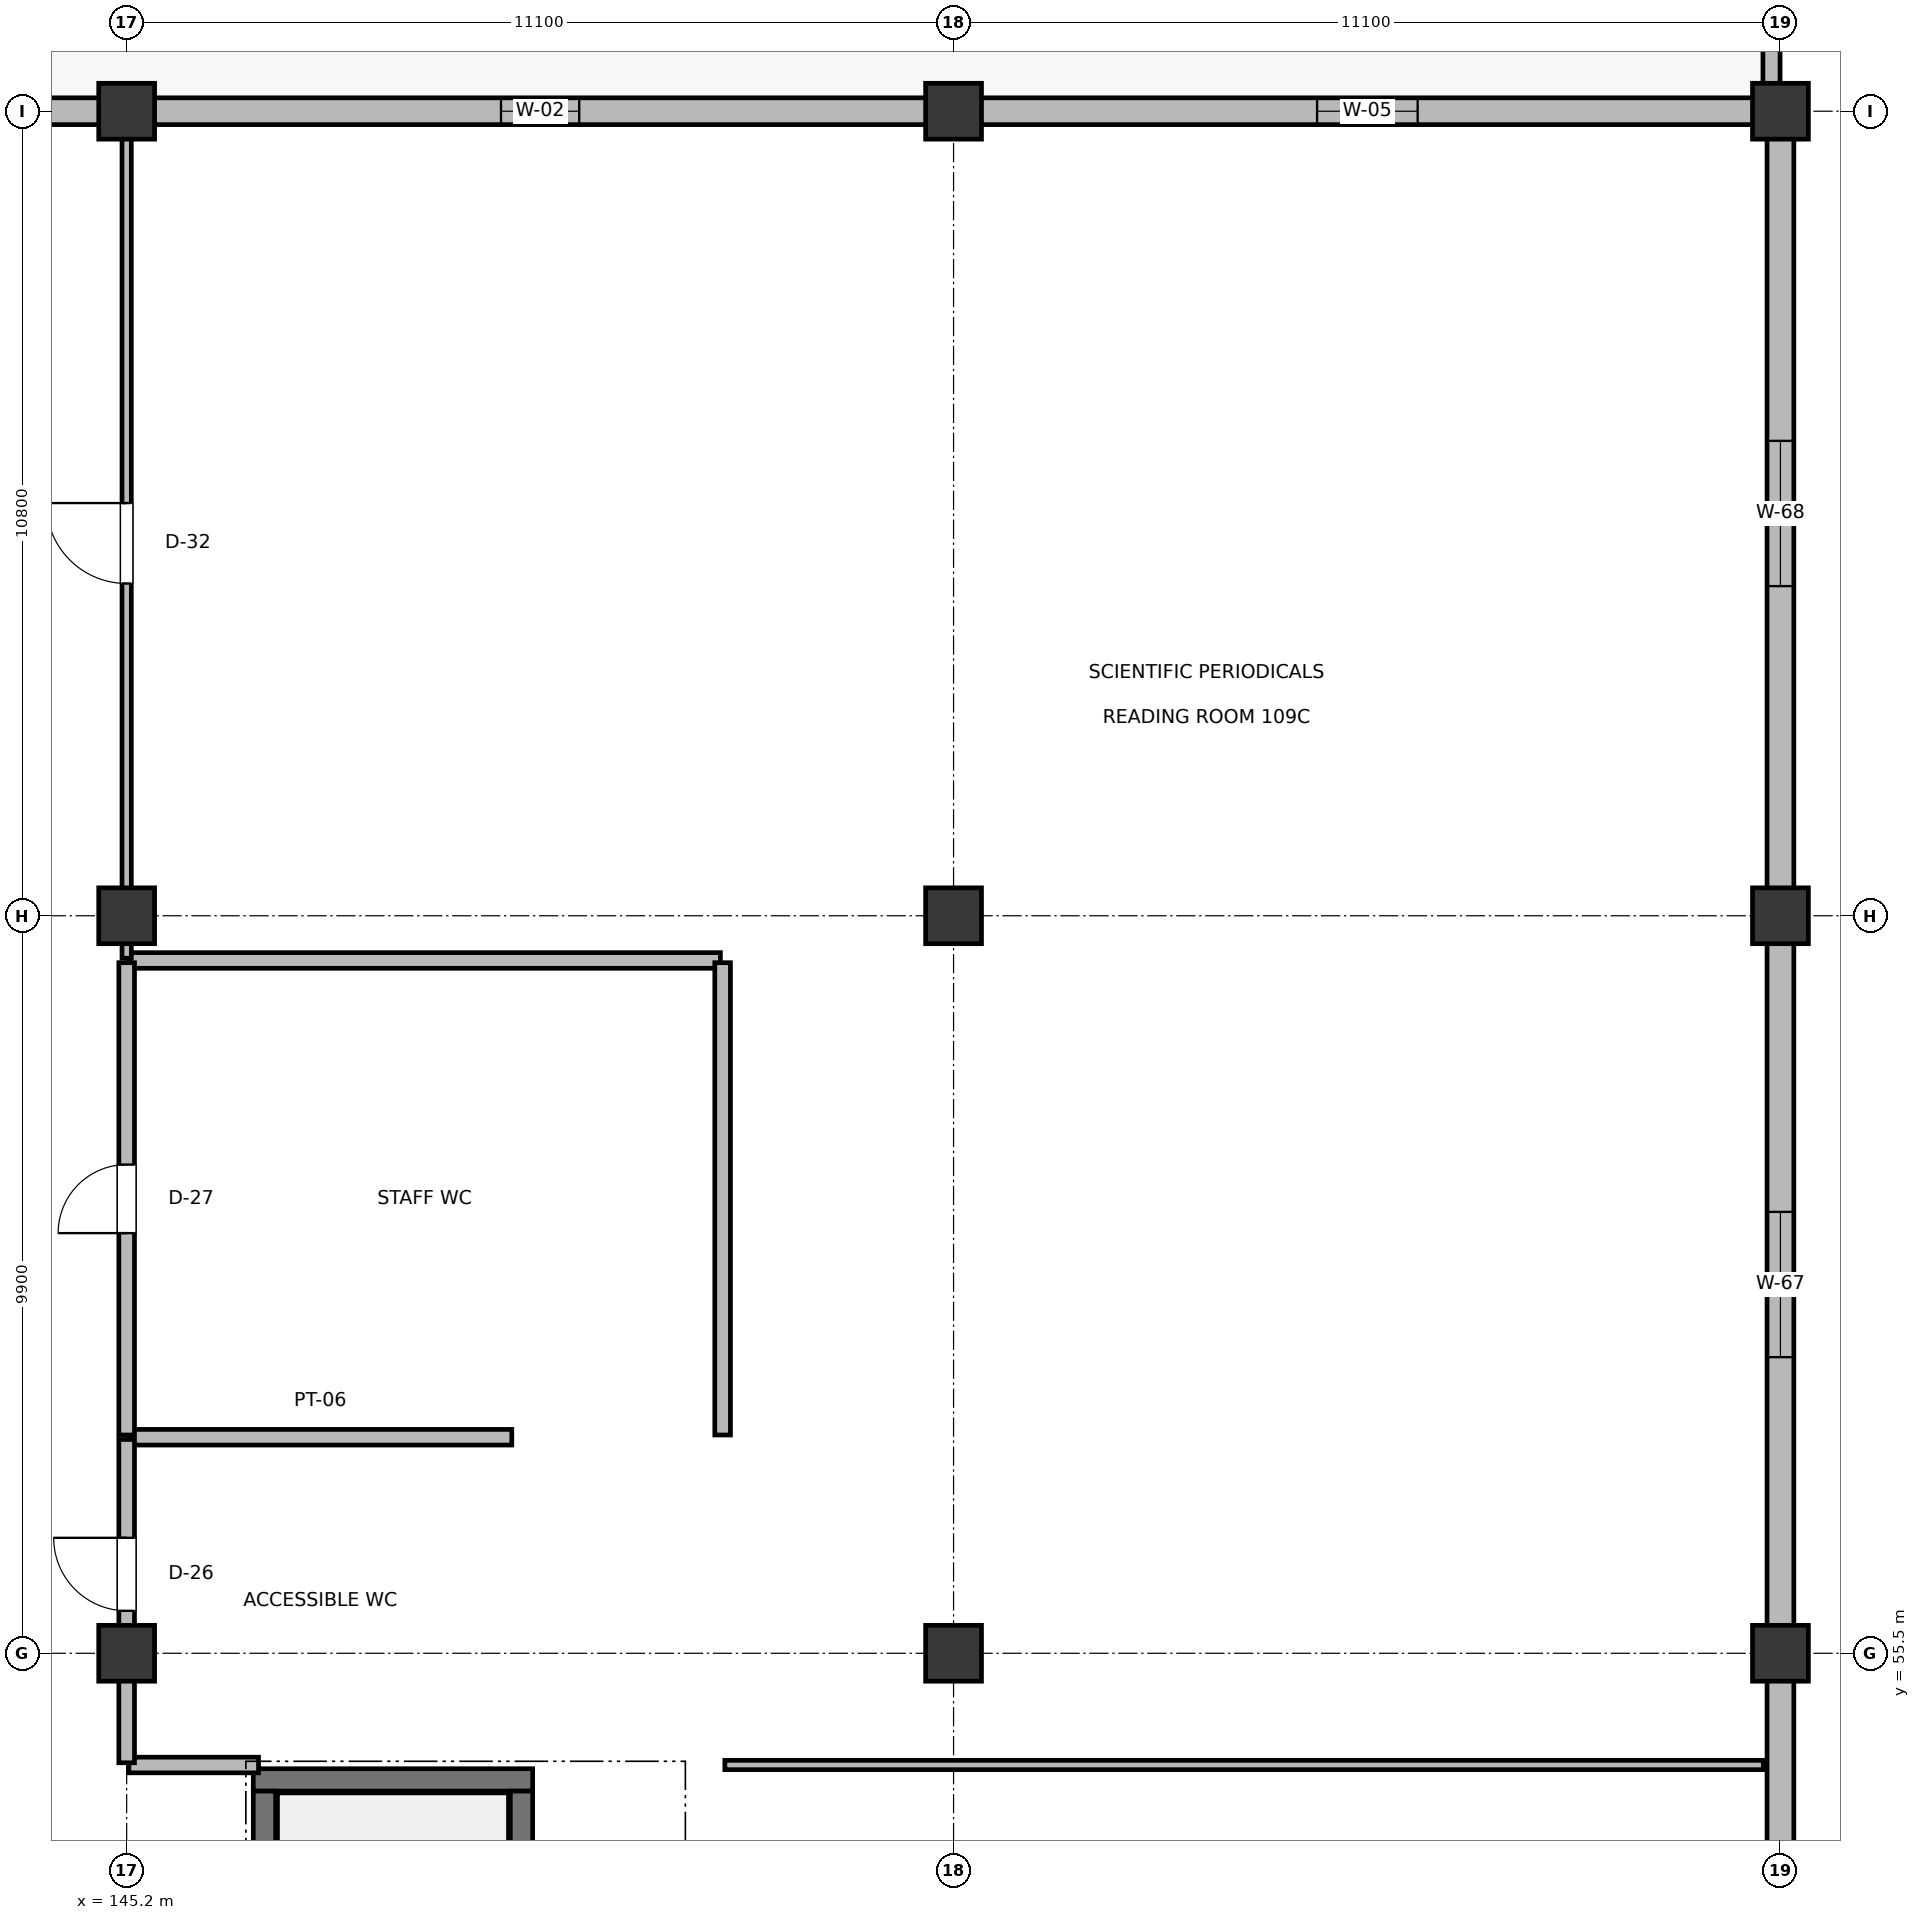
"""IFC4 building model, lengths in metres.
Left out: names, types, materials, properties, quantities, classifications, styles, units other than length and angle.
Written with IfcOpenShell. Run it as: python <this file> out.ifc"""

import sys

from ifc_helpers import new_model, si_unit, direction, frame, frame_2d, origin, origin_2d, place, context, subcontext, project, spatial, rectangle, extrude, element, fill, save


model = new_model("IFC4")
c1 = context("Model", 3, precision=1e-05, world=origin(), true_north=direction((0.0, 1.0)))
c2 = subcontext(c1, "Body", "Model", "MODEL_VIEW")
j1 = project(units=[si_unit("LENGTHUNIT", "METRE"), si_unit("PLANEANGLEUNIT", "RADIAN")], contexts=[c1])
p1 = place(None, origin())
s1 = spatial("IfcSite", under=j1, at=p1, CompositionType="ELEMENT")
p2 = place(p1, origin())
s2 = spatial("IfcBuilding", under=s1, at=p2, CompositionType="ELEMENT")
p3 = place(p2, frame((0.0, 0.0, 5.4)))
s3 = spatial("IfcBuildingStorey", under=s2, at=p3, CompositionType="ELEMENT", Elevation=5.4)
for number, where, z_axis, x_axis in (
    (1, (145.2, 55.5, 0.0), (0.0, 0.0, 1.0), (1.0, 0.0, 0.0)),
    (2, (145.2, 65.4, 0.0), (0.0, 0.0, 1.0), (1.0, 0.0, 0.0)),
    (3, (145.2, 76.2, 0.0), (0.0, 0.0, 1.0), (1.0, 0.0, 0.0)),
    (4, (156.3, 55.5, 0.0), (0.0, 0.0, 1.0), (1.0, 0.0, 0.0)),
    (5, (156.3, 65.4, 0.0), (0.0, 0.0, 1.0), (1.0, 0.0, 0.0)),
    (6, (156.3, 76.2, 0.0), (0.0, 0.0, 1.0), (1.0, 0.0, 0.0)),
    (7, (167.4, 55.5, 0.0), (0.0, 0.0, 1.0), (1.0, 0.0, 0.0)),
    (8, (167.4, 65.4, 0.0), (0.0, 0.0, 1.0), (1.0, 0.0, 0.0)),
    (9, (167.4, 76.2, 0.0), (0.0, 0.0, 1.0), (1.0, 0.0, 0.0)),
):
    element("IfcColumn", number, at=place(p3, frame(where, z_axis=z_axis, x_axis=x_axis)), inside=s3, PredefinedType="COLUMN", context=c2, shape_type="SweptSolid", body=[
        extrude(rectangle(XDim=0.75, YDim=0.75, at=origin_2d()), origin(), (0.0, 0.0, 1.0), 4.8),
    ])
p4 = place(p3, frame((167.4, 45.965, 0.0), z_axis=(0.0, 0.0, 1.0), x_axis=(0.0, 1.0, 0.0)))
e10 = element("IfcWall", 10, at=p4, inside=s3, PredefinedType="SOLIDWALL", context=c2, shape_type="SweptSolid", body=[
    extrude(rectangle(XDim=9.17, YDim=0.36, at=frame_2d((4.585, 0.0))), origin(), (0.0, 0.0, 1.0), 3.775),
])
p5 = place(p4, frame((3.61, 0.0, 0.85)))
e11 = element("IfcOpeningElement", 11, at=p5, cuts=e10, PredefinedType="OPENING", context=c2, shape_type="SweptSolid", body=[
    extrude(rectangle(XDim=1.95, YDim=1.35, at=frame_2d((0.975, 0.675))), frame((0.0, 0.19, 0.0), z_axis=(0.0, -1.0, 0.0), x_axis=(1.0, 0.0, 0.0)), (0.0, 0.0, 1.0), 0.38),
])
p6 = place(p3, frame((167.4, 55.865, 0.0), z_axis=(0.0, 0.0, 1.0), x_axis=(0.0, 1.0, 0.0)))
e12 = element("IfcWall", 12, at=p6, inside=s3, PredefinedType="SOLIDWALL", context=c2, shape_type="SweptSolid", body=[
    extrude(rectangle(XDim=9.17, YDim=0.36, at=frame_2d((4.585, 0.0))), origin(), (0.0, 0.0, 1.0), 3.775),
])
p7 = place(p6, frame((3.61, 0.0, 0.85)))
e13 = element("IfcOpeningElement", 13, at=p7, cuts=e12, PredefinedType="OPENING", context=c2, shape_type="SweptSolid", body=[
    extrude(rectangle(XDim=1.95, YDim=1.55, at=frame_2d((0.975, 0.775))), frame((0.0, 0.19, 0.0), z_axis=(0.0, -1.0, 0.0), x_axis=(1.0, 0.0, 0.0)), (0.0, 0.0, 1.0), 0.38),
])
p8 = place(p3, frame((167.4, 65.765, 0.0), z_axis=(0.0, 0.0, 1.0), x_axis=(0.0, 1.0, 0.0)))
e14 = element("IfcWall", 14, at=p8, inside=s3, PredefinedType="SOLIDWALL", context=c2, shape_type="SweptSolid", body=[
    extrude(rectangle(XDim=10.07, YDim=0.36, at=frame_2d((5.035, 0.0))), origin(), (0.0, 0.0, 1.0), 3.775),
])
p9 = place(p8, frame((4.06, 0.0, 0.85)))
e15 = element("IfcOpeningElement", 15, at=p9, cuts=e14, PredefinedType="OPENING", context=c2, shape_type="SweptSolid", body=[
    extrude(rectangle(XDim=1.95, YDim=1.75, at=frame_2d((0.975, 0.875))), frame((0.0, 0.19, 0.0), z_axis=(0.0, -1.0, 0.0), x_axis=(1.0, 0.0, 0.0)), (0.0, 0.0, 1.0), 0.38),
])
p10 = place(p3, frame((134.165, 76.2, 0.0), z_axis=(0.0, 0.0, 1.0), x_axis=(1.0, 0.0, 0.0)))
e16 = element("IfcWall", 16, at=p10, inside=s3, PredefinedType="SOLIDWALL", context=c2, shape_type="SweptSolid", body=[
    extrude(rectangle(XDim=10.67, YDim=0.36, at=frame_2d((5.335, 0.0))), origin(), (0.0, 0.0, 1.0), 3.555),
])
p11 = place(p10, frame((4.26, 0.0, 0.85)))
e17 = element("IfcOpeningElement", 17, at=p11, cuts=e16, PredefinedType="OPENING", context=c2, shape_type="SweptSolid", body=[
    extrude(rectangle(XDim=2.15, YDim=1.35, at=frame_2d((1.075, 0.675))), frame((0.0, 0.19, 0.0), z_axis=(0.0, -1.0, 0.0), x_axis=(1.0, 0.0, 0.0)), (0.0, 0.0, 1.0), 0.38),
])
p12 = place(p3, frame((145.555, 76.2, 0.0), z_axis=(0.0, 0.0, 1.0), x_axis=(1.0, 0.0, 0.0)))
e18 = element("IfcWall", 18, at=p12, inside=s3, PredefinedType="SOLIDWALL", context=c2, shape_type="SweptSolid", body=[
    extrude(rectangle(XDim=10.39, YDim=0.36, at=frame_2d((5.195, 0.0))), origin(), (0.0, 0.0, 1.0), 3.675),
])
p13 = place(p12, frame((4.67, 0.0, 0.85)))
e19 = element("IfcOpeningElement", 19, at=p13, cuts=e18, PredefinedType="OPENING", context=c2, shape_type="SweptSolid", body=[
    extrude(rectangle(XDim=1.05, YDim=1.8, at=frame_2d((0.525, 0.9))), frame((0.0, 0.19, 0.0), z_axis=(0.0, -1.0, 0.0), x_axis=(1.0, 0.0, 0.0)), (0.0, 0.0, 1.0), 0.38),
])
p14 = place(p3, frame((156.665, 76.2, 0.0), z_axis=(0.0, 0.0, 1.0), x_axis=(1.0, 0.0, 0.0)))
e20 = element("IfcWall", 20, at=p14, inside=s3, PredefinedType="SOLIDWALL", context=c2, shape_type="SweptSolid", body=[
    extrude(rectangle(XDim=10.38, YDim=0.36, at=frame_2d((5.19, 0.0))), origin(), (0.0, 0.0, 1.0), 3.955),
])
p15 = place(p14, frame((4.515, 0.0, 0.85)))
e21 = element("IfcOpeningElement", 21, at=p15, cuts=e20, PredefinedType="OPENING", context=c2, shape_type="SweptSolid", body=[
    extrude(rectangle(XDim=1.35, YDim=1.85, at=frame_2d((0.675, 0.925))), frame((0.0, 0.19, 0.0), z_axis=(0.0, -1.0, 0.0), x_axis=(1.0, 0.0, 0.0)), (0.0, 0.0, 1.0), 0.38),
])
p16 = place(p3, frame((167.28, 76.55, 0.0), z_axis=(0.0, 0.0, 1.0), x_axis=(0.0, 1.0, 0.0)))
e22 = element("IfcWall", 22, at=p16, inside=s3, PredefinedType="PARAPET", context=c2, shape_type="SweptSolid", body=[
    extrude(rectangle(XDim=40.1, YDim=0.23, at=frame_2d((20.05, 0.0))), origin(), (0.0, 0.0, 1.0), 1.05),
])
p17 = place(p3, frame((146.9, 53.8, 0.0), z_axis=(0.0, 0.0, 1.0), x_axis=(1.0, 0.0, 0.0)))
e23 = element("IfcWall", 23, at=p17, inside=s3, PredefinedType="SHEAR", context=c2, shape_type="SweptSolid", body=[
    extrude(rectangle(XDim=3.75, YDim=0.3, at=frame_2d((1.875, 0.0))), origin(), (0.0, 0.0, 1.0), 4.58),
])
for number, where, z_axis, x_axis in (
    (24, (147.05, 46.6, 0.0), (0.0, 0.0, 1.0), (0.0, 1.0, 0.0)),
    (25, (150.5, 46.6, 0.0), (0.0, 0.0, 1.0), (0.0, 1.0, 0.0)),
):
    element("IfcWall", number, at=place(p3, frame(where, z_axis=z_axis, x_axis=x_axis)), inside=s3, PredefinedType="SHEAR", context=c2, shape_type="SweptSolid", body=[
        extrude(rectangle(XDim=7.05, YDim=0.3, at=frame_2d((3.525, 0.0))), origin(), (0.0, 0.0, 1.0), 4.58),
    ])
p18 = place(p3, frame((153.23, 54.0, 0.0), z_axis=(0.0, 0.0, 1.0), x_axis=(1.0, 0.0, 0.0)))
e26 = element("IfcWall", 26, at=p18, inside=s3, PredefinedType="PARTITIONING", context=c2, shape_type="SweptSolid", body=[
    extrude(rectangle(XDim=13.94, YDim=0.125, at=frame_2d((6.97, 0.0))), origin(), (0.0, 0.0, 1.0), 3.625),
])
p19 = place(p3, frame((145.23, 58.4, 0.0), z_axis=(0.0, 0.0, 1.0), x_axis=(1.0, 0.0, 0.0)))
e27 = element("IfcWall", 27, at=p19, inside=s3, PredefinedType="PLUMBINGWALL", context=c2, shape_type="SweptSolid", body=[
    extrude(rectangle(XDim=5.14, YDim=0.21, at=frame_2d((2.57, 0.0))), origin(), (0.0, 0.0, 1.0), 3.625),
])
p20 = place(p3, frame((145.23, 54.0, 0.0), z_axis=(0.0, 0.0, 1.0), x_axis=(1.0, 0.0, 0.0)))
e28 = element("IfcWall", 28, at=p20, inside=s3, PredefinedType="PLUMBINGWALL", context=c2, shape_type="SweptSolid", body=[
    extrude(rectangle(XDim=1.74, YDim=0.21, at=frame_2d((0.87, 0.0))), origin(), (0.0, 0.0, 1.0), 3.625),
])
p21 = place(p3, frame((145.2, 54.03, 0.0), z_axis=(0.0, 0.0, 1.0), x_axis=(0.0, 1.0, 0.0)))
e29 = element("IfcWall", 29, at=p21, inside=s3, PredefinedType="PLUMBINGWALL", context=c2, shape_type="SweptSolid", body=[
    extrude(rectangle(XDim=4.34, YDim=0.21, at=frame_2d((2.17, 0.0))), origin(), (0.0, 0.0, 1.0), 3.625),
])
p22 = place(p21, frame((2.04, 0.0, 0.0)))
e30 = element("IfcOpeningElement", 30, at=p22, cuts=e29, PredefinedType="OPENING", context=c2, shape_type="SweptSolid", body=[
    extrude(rectangle(XDim=0.98, YDim=2.1, at=frame_2d((0.49, 1.05))), frame((0.0, 0.115, 0.0), z_axis=(0.0, -1.0, 0.0), x_axis=(1.0, 0.0, 0.0)), (0.0, 0.0, 1.0), 0.23),
])
p23 = place(p3, frame((145.23, 64.8, 0.0), z_axis=(0.0, 0.0, 1.0), x_axis=(1.0, 0.0, 0.0)))
e31 = element("IfcWall", 31, at=p23, inside=s3, PredefinedType="PLUMBINGWALL", context=c2, shape_type="SweptSolid", body=[
    extrude(rectangle(XDim=7.94, YDim=0.21, at=frame_2d((3.97, 0.0))), origin(), (0.0, 0.0, 1.0), 3.625),
])
p24 = place(p3, frame((153.2, 58.43, 0.0), z_axis=(0.0, 0.0, 1.0), x_axis=(0.0, 1.0, 0.0)))
e32 = element("IfcWall", 32, at=p24, inside=s3, PredefinedType="PLUMBINGWALL", context=c2, shape_type="SweptSolid", body=[
    extrude(rectangle(XDim=6.34, YDim=0.21, at=frame_2d((3.17, 0.0))), origin(), (0.0, 0.0, 1.0), 4.48),
])
p25 = place(p3, frame((145.2, 58.43, 0.0), z_axis=(0.0, 0.0, 1.0), x_axis=(0.0, 1.0, 0.0)))
e33 = element("IfcWall", 33, at=p25, inside=s3, PredefinedType="PLUMBINGWALL", context=c2, shape_type="SweptSolid", body=[
    extrude(rectangle(XDim=6.34, YDim=0.21, at=frame_2d((3.17, 0.0))), origin(), (0.0, 0.0, 1.0), 3.625),
])
p26 = place(p25, frame((2.71, 0.0, 0.0)))
e34 = element("IfcOpeningElement", 34, at=p26, cuts=e33, PredefinedType="OPENING", context=c2, shape_type="SweptSolid", body=[
    extrude(rectangle(XDim=0.92, YDim=2.1, at=frame_2d((0.46, 1.05))), frame((0.0, 0.115, 0.0), z_axis=(0.0, -1.0, 0.0), x_axis=(1.0, 0.0, 0.0)), (0.0, 0.0, 1.0), 0.23),
])
p27 = place(p3, frame((145.2, 64.83, 0.0), z_axis=(0.0, 0.0, 1.0), x_axis=(0.0, 1.0, 0.0)))
e35 = element("IfcWall", 35, at=p27, inside=s3, PredefinedType="PARTITIONING", context=c2, shape_type="SweptSolid", body=[
    extrude(rectangle(XDim=11.14, YDim=0.125, at=frame_2d((5.57, 0.0))), origin(), (0.0, 0.0, 1.0), 3.625),
])
p28 = place(p27, frame((5.03, 0.0, 0.0)))
e36 = element("IfcOpeningElement", 36, at=p28, cuts=e35, PredefinedType="OPENING", context=c2, shape_type="SweptSolid", body=[
    extrude(rectangle(XDim=1.08, YDim=2.15, at=frame_2d((0.54, 1.075))), frame((0.0, 0.073, 0.0), z_axis=(0.0, -1.0, 0.0), x_axis=(1.0, 0.0, 0.0)), (0.0, 0.0, 1.0), 0.145),
])
p29 = place(p7, frame((1.95, 0.0, 0.0), z_axis=(0.0, 0.0, 1.0), x_axis=(-1.0, 0.0, 0.0)))
e37 = element("IfcWindow", 37, at=p29, inside=s3, PartitioningType="DOUBLE_PANEL_VERTICAL", PredefinedType="WINDOW", context=c2, shape_type="SweptSolid", body=[
    extrude(rectangle(XDim=1.95, YDim=1.55, at=frame_2d((0.975, 0.775))), frame((0.0, 0.03, 0.0), z_axis=(0.0, -1.0, 0.0), x_axis=(1.0, 0.0, 0.0)), (0.0, 0.0, 1.0), 0.06),
])
fill(e13, e37)
p30 = place(p9, frame((1.95, 0.0, 0.0), z_axis=(0.0, 0.0, 1.0), x_axis=(-1.0, 0.0, 0.0)))
e38 = element("IfcWindow", 38, at=p30, inside=s3, PartitioningType="DOUBLE_PANEL_VERTICAL", PredefinedType="WINDOW", context=c2, shape_type="SweptSolid", body=[
    extrude(rectangle(XDim=1.95, YDim=1.75, at=frame_2d((0.975, 0.875))), frame((0.0, 0.03, 0.0), z_axis=(0.0, -1.0, 0.0), x_axis=(1.0, 0.0, 0.0)), (0.0, 0.0, 1.0), 0.06),
])
fill(e15, e38)
p31 = place(p13, origin())
e39 = element("IfcWindow", 39, at=p31, inside=s3, PartitioningType="SINGLE_PANEL", PredefinedType="WINDOW", context=c2, shape_type="SweptSolid", body=[
    extrude(rectangle(XDim=1.05, YDim=1.8, at=frame_2d((0.525, 0.9))), frame((0.0, 0.03, 0.0), z_axis=(0.0, -1.0, 0.0), x_axis=(1.0, 0.0, 0.0)), (0.0, 0.0, 1.0), 0.06),
])
fill(e19, e39)
p32 = place(p15, origin())
e40 = element("IfcWindow", 40, at=p32, inside=s3, PartitioningType="DOUBLE_PANEL_VERTICAL", PredefinedType="WINDOW", context=c2, shape_type="SweptSolid", body=[
    extrude(rectangle(XDim=1.35, YDim=1.85, at=frame_2d((0.675, 0.925))), frame((0.0, 0.03, 0.0), z_axis=(0.0, -1.0, 0.0), x_axis=(1.0, 0.0, 0.0)), (0.0, 0.0, 1.0), 0.06),
])
fill(e21, e40)
p33 = place(p22, origin())
e41 = element("IfcDoor", 41, at=p33, inside=s3, OperationType="SINGLE_SWING_RIGHT", PredefinedType="DOOR", context=c2, shape_type="SweptSolid", body=[
    extrude(rectangle(XDim=0.98, YDim=2.1, at=frame_2d((0.49, 1.05))), frame((0.0, 0.025, 0.0), z_axis=(0.0, -1.0, 0.0), x_axis=(1.0, 0.0, 0.0)), (0.0, 0.0, 1.0), 0.05),
])
fill(e30, e41)
p34 = place(p26, origin())
e42 = element("IfcDoor", 42, at=p34, inside=s3, OperationType="SINGLE_SWING_LEFT", PredefinedType="DOOR", context=c2, shape_type="SweptSolid", body=[
    extrude(rectangle(XDim=0.92, YDim=2.1, at=frame_2d((0.46, 1.05))), frame((0.0, 0.025, 0.0), z_axis=(0.0, -1.0, 0.0), x_axis=(1.0, 0.0, 0.0)), (0.0, 0.0, 1.0), 0.05),
])
fill(e34, e42)
p35 = place(p28, origin())
e43 = element("IfcDoor", 43, at=p35, inside=s3, OperationType="SINGLE_SWING_RIGHT", PredefinedType="DOOR", context=c2, shape_type="SweptSolid", body=[
    extrude(rectangle(XDim=1.08, YDim=2.15, at=frame_2d((0.54, 1.075))), frame((0.0, 0.025, 0.0), z_axis=(0.0, -1.0, 0.0), x_axis=(1.0, 0.0, 0.0)), (0.0, 0.0, 1.0), 0.05),
])
fill(e36, e43)
save(model, sys.argv[1])
